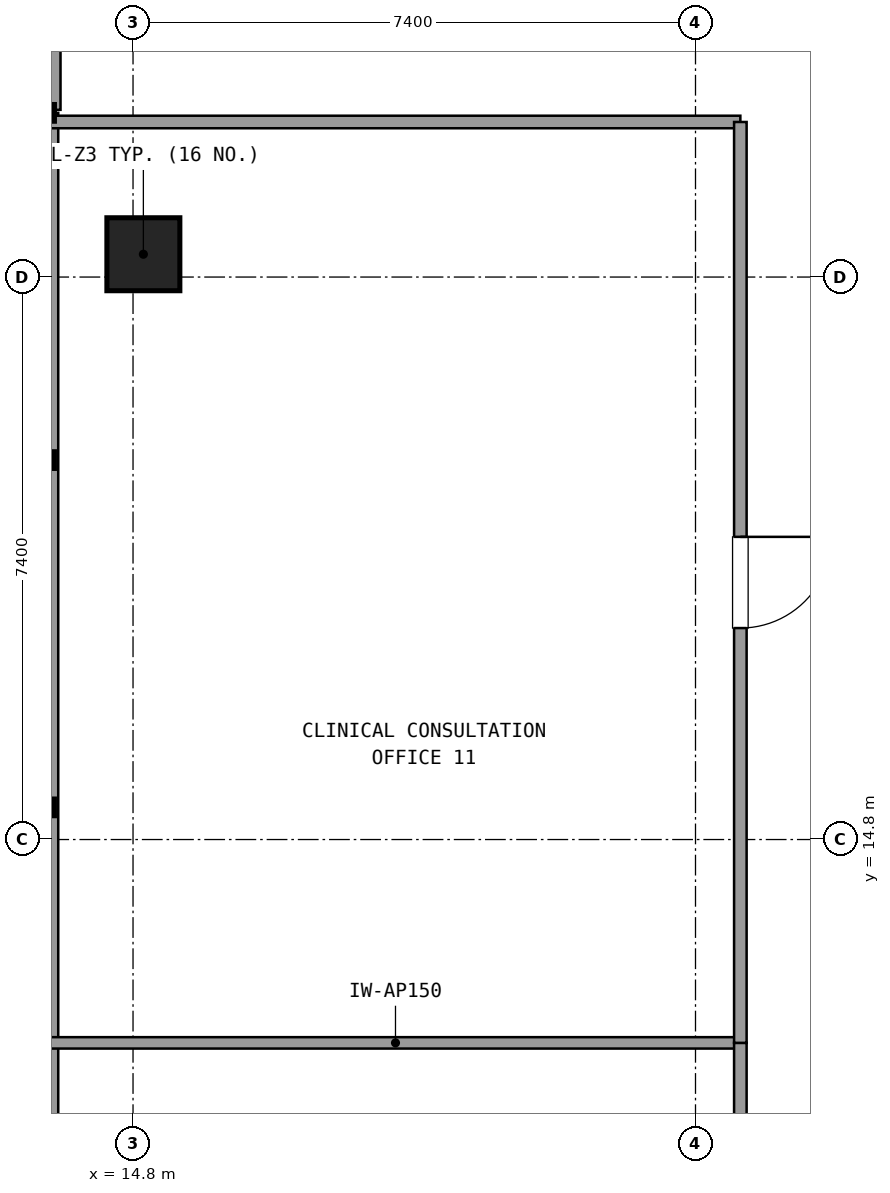
"""IFC4 building model, lengths in metres.
Left out: names, types, materials, properties, quantities, classifications, styles, units other than length and angle.
Written with IfcOpenShell. Run it as: python <this file> out.ifc"""

import sys

from ifc_helpers import new_model, si_unit, direction, frame, frame_2d, origin, origin_2d, place, context, subcontext, project, spatial, rectangle, extrude, element, fill, save


model = new_model("IFC4")
c1 = context("Model", 3, precision=1e-05, world=origin(), true_north=direction((0.0, 1.0)))
c2 = subcontext(c1, "Body", "Model", "MODEL_VIEW")
j1 = project(units=[si_unit("LENGTHUNIT", "METRE"), si_unit("PLANEANGLEUNIT", "RADIAN")], contexts=[c1])
p1 = place(None, origin())
s1 = spatial("IfcSite", under=j1, at=p1, CompositionType="ELEMENT")
p2 = place(p1, origin())
s2 = spatial("IfcBuilding", under=s1, at=p2, CompositionType="ELEMENT")
p3 = place(p2, frame((0.0, 0.0, 134.82)))
s3 = spatial("IfcBuildingStorey", under=s2, at=p3, CompositionType="ELEMENT", Elevation=134.82)
p4 = place(p3, frame((14.936, 22.5, 0.0), z_axis=(0.0, 0.0, 1.0), x_axis=(1.0, 0.0, 0.0)))
e1 = element("IfcColumn", 1, at=p4, inside=s3, PredefinedType="COLUMN", context=c2, shape_type="SweptSolid", body=[
    extrude(rectangle(XDim=0.96, YDim=0.96, at=origin_2d()), origin(), (0.0, 0.0, 1.0), 3.6),
])
p5 = place(p3, frame((13.696, 27.4, 0.0), z_axis=(0.0, 0.0, 1.0), x_axis=(0.0, -1.0, 0.0)))
e2 = element("IfcWall", 2, at=p5, inside=s3, PredefinedType="SOLIDWALL", context=c2, shape_type="SweptSolid", body=[
    extrude(rectangle(XDim=3.0, YDim=0.3, at=frame_2d((1.5, 0.0))), origin(), (0.0, 0.0, 1.0), 2.67),
])
p6 = place(p5, frame((0.9, 0.0, 0.0)))
e3 = element("IfcOpeningElement", 3, at=p6, cuts=e2, PredefinedType="OPENING", context=c2, shape_type="SweptSolid", body=[
    extrude(rectangle(XDim=1.2, YDim=2.2, at=frame_2d((0.6, 1.1))), frame((0.0, 0.16, 0.0), z_axis=(0.0, -1.0, 0.0), x_axis=(1.0, 0.0, 0.0)), (0.0, 0.0, 1.0), 0.32),
])
p7 = place(p3, frame((13.696, 24.36, 0.0), z_axis=(0.0, 0.0, 1.0), x_axis=(0.0, -1.0, 0.0)))
e4 = element("IfcWall", 4, at=p7, inside=s3, PredefinedType="SOLIDWALL", context=c2, shape_type="SweptSolid", body=[
    extrude(rectangle(XDim=13.705, YDim=0.24, at=frame_2d((6.853, 0.0))), origin(), (0.0, 0.0, 1.0), 0.85),
])
p8 = place(p3, frame((13.716, 24.24, 0.0), z_axis=(0.0, 0.0, 1.0), x_axis=(1.0, 0.0, 0.0)))
e5 = element("IfcWall", 5, at=p8, inside=s3, PredefinedType="PARTITIONING", context=c2, shape_type="SweptSolid", body=[
    extrude(rectangle(XDim=9.074, YDim=0.165, at=frame_2d((4.537, 0.0))), origin(), (0.0, 0.0, 1.0), 2.61),
])
p9 = place(p3, frame((22.79, 12.125, 0.0), z_axis=(0.0, 0.0, 1.0), x_axis=(-1.0, 0.0, 0.0)))
e6 = element("IfcWall", 6, at=p9, inside=s3, PredefinedType="PARTITIONING", context=c2, shape_type="SweptSolid", body=[
    extrude(rectangle(XDim=9.074, YDim=0.15, at=frame_2d((4.537, 0.0))), origin(), (0.0, 0.0, 1.0), 2.61),
])
p10 = place(p3, frame((22.79, 4.7, 0.0), z_axis=(0.0, 0.0, 1.0), x_axis=(0.0, 1.0, 0.0)))
e7 = element("IfcWall", 7, at=p10, inside=s3, PredefinedType="PARTITIONING", context=c2, shape_type="SweptSolid", body=[
    extrude(rectangle(XDim=7.425, YDim=0.165, at=frame_2d((3.712, 0.0))), origin(), (0.0, 0.0, 1.0), 2.61),
])
p11 = place(p10, frame((3.112, 0.0, 0.0)))
e8 = element("IfcOpeningElement", 8, at=p11, cuts=e7, PredefinedType="OPENING", context=c2, shape_type="SweptSolid", body=[
    extrude(rectangle(XDim=1.2, YDim=2.15, at=frame_2d((0.6, 1.075))), frame((0.0, 0.093, 0.0), z_axis=(0.0, -1.0, 0.0), x_axis=(1.0, 0.0, 0.0)), (0.0, 0.0, 1.0), 0.185),
])
p12 = place(p3, frame((22.79, 12.125, 0.0), z_axis=(0.0, 0.0, 1.0), x_axis=(0.0, 1.0, 0.0)))
e9 = element("IfcWall", 9, at=p12, inside=s3, PredefinedType="PARTITIONING", context=c2, shape_type="SweptSolid", body=[
    extrude(rectangle(XDim=12.115, YDim=0.165, at=frame_2d((6.058, 0.0))), origin(), (0.0, 0.0, 1.0), 2.61),
])
p13 = place(p12, frame((5.457, 0.0, 0.0)))
e10 = element("IfcOpeningElement", 10, at=p13, cuts=e9, PredefinedType="OPENING", context=c2, shape_type="SweptSolid", body=[
    extrude(rectangle(XDim=1.2, YDim=2.15, at=frame_2d((0.6, 1.075))), frame((0.0, 0.093, 0.0), z_axis=(0.0, -1.0, 0.0), x_axis=(1.0, 0.0, 0.0)), (0.0, 0.0, 1.0), 0.185),
])
p14 = place(p13, frame((1.2, 0.0, 0.0), z_axis=(0.0, 0.0, 1.0), x_axis=(-1.0, 0.0, 0.0)))
e11 = element("IfcDoor", 11, at=p14, inside=s3, OperationType="SINGLE_SWING_RIGHT", PredefinedType="DOOR", context=c2, shape_type="SweptSolid", body=[
    extrude(rectangle(XDim=1.2, YDim=2.15, at=frame_2d((0.6, 1.075))), frame((0.0, 0.025, 0.0), z_axis=(0.0, -1.0, 0.0), x_axis=(1.0, 0.0, 0.0)), (0.0, 0.0, 1.0), 0.05),
])
fill(e10, e11)
save(model, sys.argv[1])
